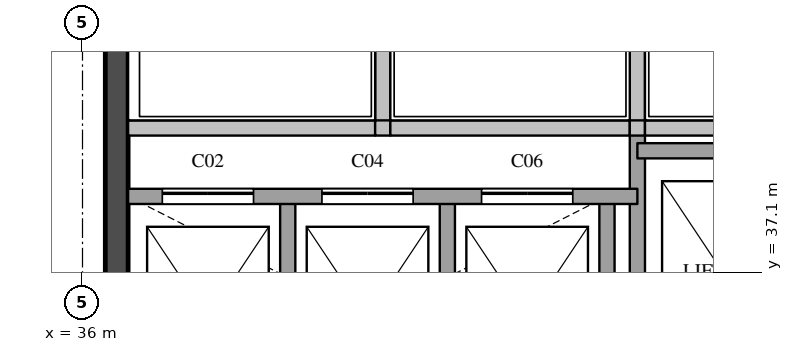
"""IFC4 building model, lengths in metres.
Left out: names, types, materials, properties, quantities, classifications, styles, units other than length and angle.
Written with IfcOpenShell. Run it as: python <this file> out.ifc"""

import sys

from ifc_helpers import new_model, si_unit, direction, frame, frame_2d, origin, place, context, subcontext, project, spatial, rectangle, extrude, element, fill, save


model = new_model("IFC4")
c1 = context("Model", 3, precision=1e-05, world=origin(), true_north=direction((0.0, 1.0)))
c2 = subcontext(c1, "Body", "Model", "MODEL_VIEW")
j1 = project(units=[si_unit("LENGTHUNIT", "METRE"), si_unit("PLANEANGLEUNIT", "RADIAN")], contexts=[c1])
p1 = place(None, origin())
s1 = spatial("IfcSite", under=j1, at=p1, CompositionType="ELEMENT")
p2 = place(p1, origin())
s2 = spatial("IfcBuilding", under=s1, at=p2, CompositionType="ELEMENT")
p3 = place(p2, frame((0.0, 0.0, 312.9)))
s3 = spatial("IfcBuildingStorey", under=s2, at=p3, CompositionType="ELEMENT", Elevation=312.9)
p4 = place(p3, frame((36.45, 29.1, 0.0), z_axis=(0.0, 0.0, 1.0), x_axis=(0.0, 1.0, 0.0)))
e1 = element("IfcWall", 1, at=p4, inside=s3, PredefinedType="SHEAR", context=c2, shape_type="SweptSolid", body=[
    extrude(rectangle(XDim=20.3, YDim=0.3, at=frame_2d((10.15, 0.0))), origin(), (0.0, 0.0, 1.0), 3.6),
])
p5 = place(p4, frame((3.6, 0.0, 0.0)))
e2 = element("IfcOpeningElement", 2, at=p5, cuts=e1, PredefinedType="OPENING", context=c2, shape_type="SweptSolid", body=[
    extrude(rectangle(XDim=1.8, YDim=2.1, at=frame_2d((0.9, 1.05))), frame((0.0, 0.16, 0.0), z_axis=(0.0, -1.0, 0.0), x_axis=(1.0, 0.0, 0.0)), (0.0, 0.0, 1.0), 0.32),
])
p6 = place(p4, frame((16.4, 0.0, 0.0)))
e3 = element("IfcOpeningElement", 3, at=p6, cuts=e1, PredefinedType="OPENING", context=c2, shape_type="SweptSolid", body=[
    extrude(rectangle(XDim=1.0, YDim=2.1, at=frame_2d((0.5, 1.05))), frame((0.0, 0.16, 0.0), z_axis=(0.0, -1.0, 0.0), x_axis=(1.0, 0.0, 0.0)), (0.0, 0.0, 1.0), 0.32),
])
p7 = place(p3, frame((38.7, 34.9, 0.0), z_axis=(0.0, 0.0, 1.0), x_axis=(0.0, 1.0, 0.0)))
e4 = element("IfcWall", 4, at=p7, inside=s3, PredefinedType="SOLIDWALL", context=c2, shape_type="SweptSolid", body=[
    extrude(rectangle(XDim=3.2, YDim=0.2, at=frame_2d((1.6, 0.0))), origin(), (0.0, 0.0, 1.0), 3.6),
])
p8 = place(p3, frame((39.95, 39.0, 0.0), z_axis=(0.0, 0.0, 1.0), x_axis=(0.0, 1.0, 0.0)))
e5 = element("IfcWall", 5, at=p8, inside=s3, PredefinedType="SOLIDWALL", context=c2, shape_type="SweptSolid", body=[
    extrude(rectangle(XDim=1.78, YDim=0.2, at=frame_2d((0.89, 0.0))), origin(), (0.0, 0.0, 1.0), 3.6),
])
for number, where, z_axis, x_axis in (
    (6, (40.8, 34.9, 0.0), (0.0, 0.0, 1.0), (0.0, 1.0, 0.0)),
    (7, (42.9, 34.9, 0.0), (0.0, 0.0, 1.0), (0.0, 1.0, 0.0)),
):
    element("IfcWall", number, at=place(p3, frame(where, z_axis=z_axis, x_axis=x_axis)), inside=s3, PredefinedType="SOLIDWALL", context=c2, shape_type="SweptSolid", body=[
        extrude(rectangle(XDim=3.2, YDim=0.2, at=frame_2d((1.6, 0.0))), origin(), (0.0, 0.0, 1.0), 3.6),
    ])
p9 = place(p3, frame((43.3, 29.1, 0.0), z_axis=(0.0, 0.0, 1.0), x_axis=(0.0, 1.0, 0.0)))
e8 = element("IfcWall", 8, at=p9, inside=s3, PredefinedType="SOLIDWALL", context=c2, shape_type="SweptSolid", body=[
    extrude(rectangle(XDim=9.9, YDim=0.2, at=frame_2d((4.95, 0.0))), origin(), (0.0, 0.0, 1.0), 3.6),
])
p10 = place(p3, frame((43.3, 39.0, 0.0), z_axis=(0.0, 0.0, 1.0), x_axis=(0.0, 1.0, 0.0)))
e9 = element("IfcWall", 9, at=p10, inside=s3, PredefinedType="SOLIDWALL", context=c2, shape_type="SweptSolid", body=[
    extrude(rectangle(XDim=1.78, YDim=0.2, at=frame_2d((0.89, 0.0))), origin(), (0.0, 0.0, 1.0), 3.6),
])
p11 = place(p3, frame((36.6, 38.1, 0.0), z_axis=(0.0, 0.0, 1.0), x_axis=(1.0, 0.0, 0.0)))
e10 = element("IfcWall", 10, at=p11, inside=s3, PredefinedType="SOLIDWALL", context=c2, shape_type="SweptSolid", body=[
    extrude(rectangle(XDim=6.7, YDim=0.2, at=frame_2d((3.35, 0.0))), origin(), (0.0, 0.0, 1.0), 3.6),
])
p12 = place(p11, frame((0.45, 0.0, 0.0)))
e11 = element("IfcOpeningElement", 11, at=p12, cuts=e10, PredefinedType="OPENING", context=c2, shape_type="SweptSolid", body=[
    extrude(rectangle(XDim=1.2, YDim=2.1, at=frame_2d((0.6, 1.05))), frame((0.0, 0.11, 0.0), z_axis=(0.0, -1.0, 0.0), x_axis=(1.0, 0.0, 0.0)), (0.0, 0.0, 1.0), 0.22),
])
p13 = place(p11, frame((2.55, 0.0, 0.0)))
e12 = element("IfcOpeningElement", 12, at=p13, cuts=e10, PredefinedType="OPENING", context=c2, shape_type="SweptSolid", body=[
    extrude(rectangle(XDim=1.2, YDim=2.1, at=frame_2d((0.6, 1.05))), frame((0.0, 0.11, 0.0), z_axis=(0.0, -1.0, 0.0), x_axis=(1.0, 0.0, 0.0)), (0.0, 0.0, 1.0), 0.22),
])
p14 = place(p11, frame((4.65, 0.0, 0.0)))
e13 = element("IfcOpeningElement", 13, at=p14, cuts=e10, PredefinedType="OPENING", context=c2, shape_type="SweptSolid", body=[
    extrude(rectangle(XDim=1.2, YDim=2.1, at=frame_2d((0.6, 1.05))), frame((0.0, 0.11, 0.0), z_axis=(0.0, -1.0, 0.0), x_axis=(1.0, 0.0, 0.0)), (0.0, 0.0, 1.0), 0.22),
])
p15 = place(p3, frame((43.3, 38.7, 0.0), z_axis=(0.0, 0.0, 1.0), x_axis=(1.0, 0.0, 0.0)))
e14 = element("IfcWall", 14, at=p15, inside=s3, PredefinedType="SOLIDWALL", context=c2, shape_type="SweptSolid", body=[
    extrude(rectangle(XDim=4.5, YDim=0.2, at=frame_2d((2.25, 0.0))), origin(), (0.0, 0.0, 1.0), 3.6),
])
p16 = place(p3, frame((36.6, 39.0, 0.0), z_axis=(0.0, 0.0, 1.0), x_axis=(1.0, 0.0, 0.0)))
e15 = element("IfcWall", 15, at=p16, inside=s3, PredefinedType="SOLIDWALL", context=c2, shape_type="SweptSolid", body=[
    extrude(rectangle(XDim=3.25, YDim=0.2, at=frame_2d((1.625, 0.0))), origin(), (0.0, 0.0, 1.0), 3.6),
])
p17 = place(p3, frame((39.85, 39.0, 0.0), z_axis=(0.0, 0.0, 1.0), x_axis=(1.0, 0.0, 0.0)))
e16 = element("IfcWall", 16, at=p17, inside=s3, PredefinedType="SOLIDWALL", context=c2, shape_type="SweptSolid", body=[
    extrude(rectangle(XDim=0.2, YDim=0.2, at=frame_2d((0.1, 0.0))), origin(), (0.0, 0.0, 1.0), 3.6),
])
p18 = place(p3, frame((40.05, 39.0, 0.0), z_axis=(0.0, 0.0, 1.0), x_axis=(1.0, 0.0, 0.0)))
e17 = element("IfcWall", 17, at=p18, inside=s3, PredefinedType="SOLIDWALL", context=c2, shape_type="SweptSolid", body=[
    extrude(rectangle(XDim=3.15, YDim=0.2, at=frame_2d((1.575, 0.0))), origin(), (0.0, 0.0, 1.0), 3.6),
])
p19 = place(p3, frame((43.2, 39.0, 0.0), z_axis=(0.0, 0.0, 1.0), x_axis=(1.0, 0.0, 0.0)))
e18 = element("IfcWall", 18, at=p19, inside=s3, PredefinedType="SOLIDWALL", context=c2, shape_type="SweptSolid", body=[
    extrude(rectangle(XDim=0.2, YDim=0.2, at=frame_2d((0.1, 0.0))), origin(), (0.0, 0.0, 1.0), 3.6),
])
p20 = place(p3, frame((43.4, 39.0, 0.0), z_axis=(0.0, 0.0, 1.0), x_axis=(1.0, 0.0, 0.0)))
e19 = element("IfcWall", 19, at=p20, inside=s3, PredefinedType="SOLIDWALL", context=c2, shape_type="SweptSolid", body=[
    extrude(rectangle(XDim=3.25, YDim=0.2, at=frame_2d((1.625, 0.0))), origin(), (0.0, 0.0, 1.0), 3.6),
])
p21 = place(p12, origin())
e20 = element("IfcDoor", 20, at=p21, inside=s3, OperationType="SLIDING_TO_LEFT", PredefinedType="DOOR", context=c2, shape_type="SweptSolid", body=[
    extrude(rectangle(XDim=1.2, YDim=2.1, at=frame_2d((0.6, 1.05))), frame((0.0, 0.025, 0.0), z_axis=(0.0, -1.0, 0.0), x_axis=(1.0, 0.0, 0.0)), (0.0, 0.0, 1.0), 0.05),
])
fill(e11, e20)
p22 = place(p13, origin())
e21 = element("IfcDoor", 21, at=p22, inside=s3, OperationType="SLIDING_TO_LEFT", PredefinedType="DOOR", context=c2, shape_type="SweptSolid", body=[
    extrude(rectangle(XDim=1.2, YDim=2.1, at=frame_2d((0.6, 1.05))), frame((0.0, 0.025, 0.0), z_axis=(0.0, -1.0, 0.0), x_axis=(1.0, 0.0, 0.0)), (0.0, 0.0, 1.0), 0.05),
])
fill(e12, e21)
p23 = place(p14, origin())
e22 = element("IfcDoor", 22, at=p23, inside=s3, OperationType="SLIDING_TO_LEFT", PredefinedType="DOOR", context=c2, shape_type="SweptSolid", body=[
    extrude(rectangle(XDim=1.2, YDim=2.1, at=frame_2d((0.6, 1.05))), frame((0.0, 0.025, 0.0), z_axis=(0.0, -1.0, 0.0), x_axis=(1.0, 0.0, 0.0)), (0.0, 0.0, 1.0), 0.05),
])
fill(e13, e22)
save(model, sys.argv[1])
